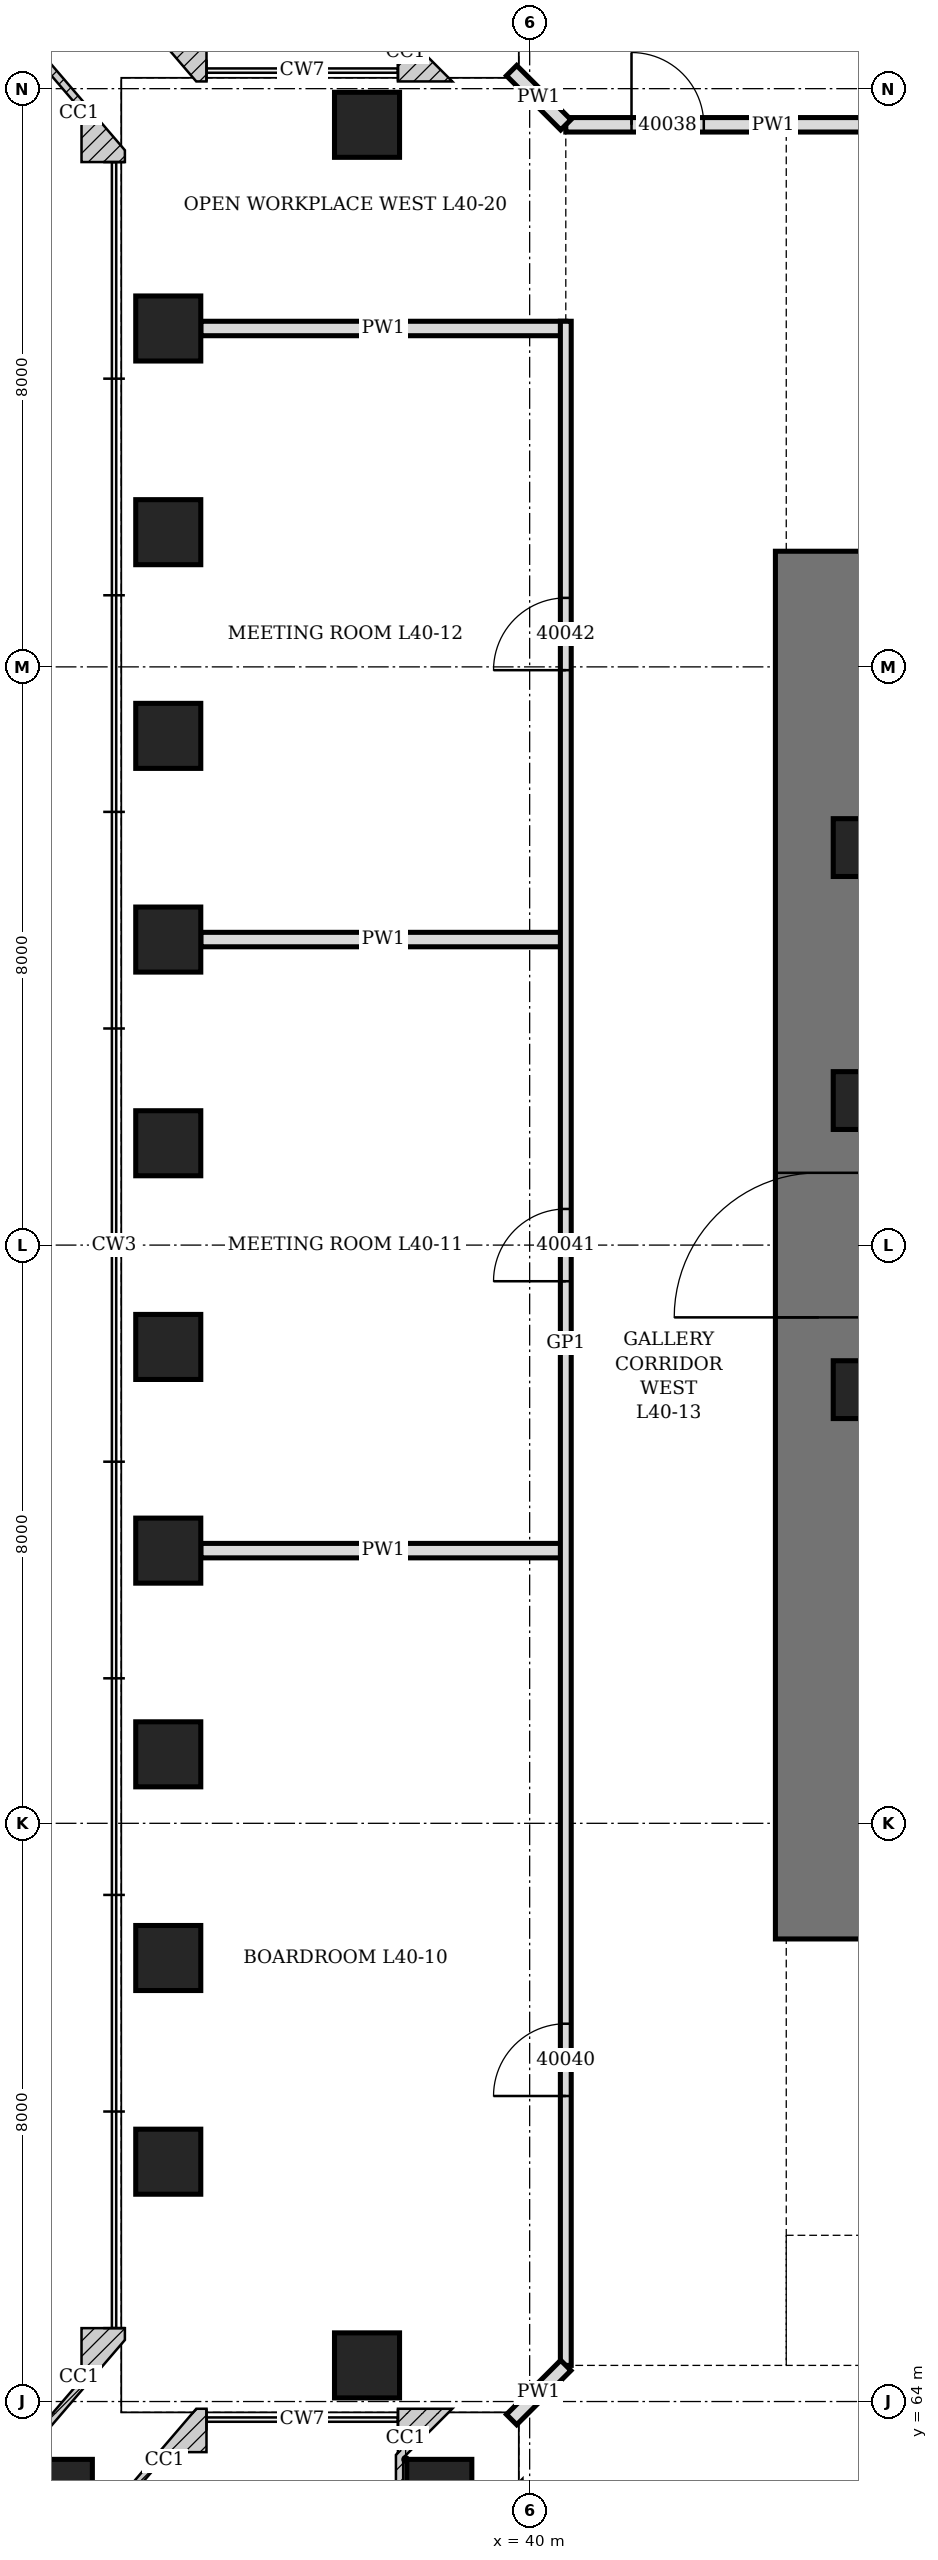
"""IFC4 building model, lengths in metres.
Left out: names, types, materials, properties, quantities, classifications, styles, units other than length and angle.
Written with IfcOpenShell. Run it as: python <this file> out.ifc"""

import sys

from ifc_helpers import new_model, si_unit, direction, frame, frame_2d, origin, origin_2d, place, context, subcontext, project, spatial, rectangle, hollow_rectangle, extrude, clip, halfspace, element, fill, save


model = new_model("IFC4")
c1 = context("Model", 3, precision=1e-05, world=origin(), true_north=direction((0.0, 1.0)))
c2 = subcontext(c1, "Body", "Model", "MODEL_VIEW")
j1 = project(units=[si_unit("LENGTHUNIT", "METRE"), si_unit("PLANEANGLEUNIT", "RADIAN")], contexts=[c1])
p1 = place(None, origin())
s1 = spatial("IfcSite", under=j1, at=p1, CompositionType="ELEMENT")
p2 = place(p1, origin())
s2 = spatial("IfcBuilding", under=s1, at=p2, CompositionType="ELEMENT")
p3 = place(p2, frame((0.0, 0.0, 181.3)))
s3 = spatial("IfcBuildingStorey", under=s2, at=p3, CompositionType="ELEMENT", Elevation=181.3)
p4 = place(p3, frame((38.75, 97.25, -0.25), z_axis=(0.343685624304, -0.343685624304, 0.873933855216), x_axis=(0.707106781187, 0.707106781187, 0.0)))
e1 = element("IfcColumn", 1, at=p4, inside=s3, PredefinedType="COLUMN", context=c2, shape_type="Clipping", body=[
    clip(clip(extrude(hollow_rectangle(XDim=0.9, YDim=0.9, WallThickness=0.15, at=origin_2d()), origin(), (0.0, 0.0, 1.0), 5.092), halfspace(frame((0.0, 0.0, 0.253), z_axis=(0.0, 0.0, 1.0), x_axis=(1.0, 0.0, 0.0)), True)), halfspace(frame((0.0, 0.0, 4.839), z_axis=(0.0, 0.0, -1.0), x_axis=(1.0, 0.0, 0.0)), True)),
])
p5 = place(p3, frame((37.75, 95.5, -0.25), z_axis=(0.0, 0.0, 1.0), x_axis=(1.0, 0.0, 0.0)))
e2 = element("IfcColumn", 2, at=p5, inside=s3, PredefinedType="COLUMN", context=c2, shape_type="SweptSolid", body=[
    extrude(hollow_rectangle(XDim=0.9, YDim=0.9, WallThickness=0.15, at=origin_2d()), origin(), (0.0, 0.0, 1.0), 4.45),
])
p6 = place(p3, frame((33.5, 97.25, -0.25), z_axis=(0.299314960964, -0.349200787792, 0.887957974202), x_axis=(0.759256602365, 0.650791373456, 0.0)))
e3 = element("IfcColumn", 3, at=p6, inside=s3, PredefinedType="COLUMN", context=c2, shape_type="Clipping", body=[
    clip(clip(extrude(hollow_rectangle(XDim=0.9, YDim=0.9, WallThickness=0.15, at=origin_2d()), origin(), (0.0, 0.0, 1.0), 5.011), halfspace(frame((0.0, 0.0, 0.235), z_axis=(0.0, 0.0, 1.0), x_axis=(1.0, 0.0, 0.0)), True)), halfspace(frame((0.0, 0.0, 4.776), z_axis=(0.0, 0.0, -1.0), x_axis=(1.0, 0.0, 0.0)), True)),
])
for number, where, z_axis, x_axis in (
    (4, (35.0, 92.682, -0.25), (0.0, 0.0, 1.0), (0.0, 1.0, 0.0)),
    (5, (35.0, 89.864, -0.25), (0.0, 0.0, 1.0), (0.0, 1.0, 0.0)),
    (6, (35.0, 87.045, -0.25), (0.0, 0.0, 1.0), (0.0, 1.0, 0.0)),
    (7, (35.0, 84.227, -0.25), (0.0, 0.0, 1.0), (0.0, 1.0, 0.0)),
    (8, (35.0, 81.409, -0.25), (0.0, 0.0, 1.0), (0.0, 1.0, 0.0)),
    (9, (35.0, 78.591, -0.25), (0.0, 0.0, 1.0), (0.0, 1.0, 0.0)),
    (10, (35.0, 75.773, -0.25), (0.0, 0.0, 1.0), (0.0, 1.0, 0.0)),
    (11, (35.0, 72.955, -0.25), (0.0, 0.0, 1.0), (0.0, 1.0, 0.0)),
    (12, (35.0, 70.136, -0.25), (0.0, 0.0, 1.0), (0.0, 1.0, 0.0)),
    (13, (35.0, 67.318, -0.25), (0.0, 0.0, 1.0), (0.0, 1.0, 0.0)),
):
    element("IfcColumn", number, at=place(p3, frame(where, z_axis=z_axis, x_axis=x_axis)), inside=s3, PredefinedType="COLUMN", context=c2, shape_type="SweptSolid", body=[
        extrude(hollow_rectangle(XDim=0.9, YDim=0.9, WallThickness=0.15, at=origin_2d()), origin(), (0.0, 0.0, 1.0), 4.45),
    ])
p7 = place(p3, frame((33.5, 62.75, -0.25), z_axis=(0.299314960964, 0.349200787792, 0.887957974202), x_axis=(-0.759256602365, 0.650791373456, 0.0)))
e14 = element("IfcColumn", 14, at=p7, inside=s3, PredefinedType="COLUMN", context=c2, shape_type="Clipping", body=[
    clip(clip(extrude(hollow_rectangle(XDim=0.9, YDim=0.9, WallThickness=0.15, at=origin_2d()), origin(), (0.0, 0.0, 1.0), 5.011), halfspace(frame((0.0, 0.0, 0.235), z_axis=(0.0, 0.0, 1.0), x_axis=(1.0, 0.0, 0.0)), True)), halfspace(frame((0.0, 0.0, 4.776), z_axis=(0.0, 0.0, -1.0), x_axis=(1.0, 0.0, 0.0)), True)),
])
p8 = place(p3, frame((37.75, 64.5, -0.25), z_axis=(0.0, 0.0, 1.0), x_axis=(1.0, 0.0, 0.0)))
e15 = element("IfcColumn", 15, at=p8, inside=s3, PredefinedType="COLUMN", context=c2, shape_type="SweptSolid", body=[
    extrude(hollow_rectangle(XDim=0.9, YDim=0.9, WallThickness=0.15, at=origin_2d()), origin(), (0.0, 0.0, 1.0), 4.45),
])
p9 = place(p3, frame((38.75, 62.75, -0.25), z_axis=(0.343685624304, 0.343685624304, 0.873933855216), x_axis=(-0.707106781187, 0.707106781187, 0.0)))
e16 = element("IfcColumn", 16, at=p9, inside=s3, PredefinedType="COLUMN", context=c2, shape_type="Clipping", body=[
    clip(clip(extrude(hollow_rectangle(XDim=0.9, YDim=0.9, WallThickness=0.15, at=origin_2d()), origin(), (0.0, 0.0, 1.0), 5.092), halfspace(frame((0.0, 0.0, 0.253), z_axis=(0.0, 0.0, 1.0), x_axis=(1.0, 0.0, 0.0)), True)), halfspace(frame((0.0, 0.0, 4.839), z_axis=(0.0, 0.0, -1.0), x_axis=(1.0, 0.0, 0.0)), True)),
])
p10 = place(p3, frame((44.0, 70.4, 0.0), z_axis=(0.0, 0.0, 1.0), x_axis=(0.0, 1.0, 0.0)))
e17 = element("IfcWall", 17, at=p10, inside=s3, PredefinedType="SHEAR", context=c2, shape_type="SweptSolid", body=[
    extrude(rectangle(XDim=19.2, YDim=1.2, at=frame_2d((9.6, 0.0))), origin(), (0.0, 0.0, 1.0), 4.2),
])
p11 = place(p10, frame((8.6, 0.0, 0.0)))
e18 = element("IfcOpeningElement", 18, at=p11, cuts=e17, PredefinedType="OPENING", context=c2, shape_type="SweptSolid", body=[
    extrude(rectangle(XDim=2.0, YDim=2.4, at=frame_2d((1.0, 1.2))), frame((0.0, 0.61, 0.0), z_axis=(0.0, -1.0, 0.0), x_axis=(1.0, 0.0, 0.0)), (0.0, 0.0, 1.0), 1.22),
])
for number, where, z_axis, x_axis in (
    (19, (44.6, 78.0, 0.0), (0.0, 0.0, 1.0), (1.0, 0.0, 0.0)),
    (20, (44.6, 82.0, 0.0), (0.0, 0.0, 1.0), (1.0, 0.0, 0.0)),
    (21, (44.6, 85.5, 0.0), (0.0, 0.0, 1.0), (1.0, 0.0, 0.0)),
):
    element("IfcColumn", number, at=place(p3, frame(where, z_axis=z_axis, x_axis=x_axis)), inside=s3, PredefinedType="COLUMN", context=c2, shape_type="SweptSolid", body=[
        extrude(hollow_rectangle(XDim=0.8, YDim=0.8, WallThickness=0.1, at=origin_2d()), origin(), (0.0, 0.0, 1.0), 4.2),
    ])
for number, where, z_axis, x_axis in (
    (22, (35.45, 75.773, 0.0), (0.0, 0.0, 1.0), (1.0, 0.0, 0.0)),
    (23, (35.45, 84.227, 0.0), (0.0, 0.0, 1.0), (1.0, 0.0, 0.0)),
    (24, (35.45, 92.682, 0.0), (0.0, 0.0, 1.0), (1.0, 0.0, 0.0)),
):
    element("IfcWall", number, at=place(p3, frame(where, z_axis=z_axis, x_axis=x_axis)), inside=s3, PredefinedType="PARTITIONING", context=c2, shape_type="SweptSolid", body=[
        extrude(rectangle(XDim=5.05, YDim=0.2, at=frame_2d((2.525, 0.0))), origin(), (0.0, 0.0, 1.0), 3.428),
    ])
p12 = place(p3, frame((40.5, 95.5, 0.0), z_axis=(0.0, 0.0, 1.0), x_axis=(1.0, 0.0, 0.0)))
e25 = element("IfcWall", 25, at=p12, inside=s3, PredefinedType="PARTITIONING", context=c2, shape_type="SweptSolid", body=[
    extrude(rectangle(XDim=5.736, YDim=0.2, at=frame_2d((2.868, 0.0))), origin(), (0.0, 0.0, 1.0), 4.04),
])
p13 = place(p12, frame((0.909, 0.0, 0.0)))
e26 = element("IfcOpeningElement", 26, at=p13, cuts=e25, PredefinedType="OPENING", context=c2, shape_type="SweptSolid", body=[
    extrude(rectangle(XDim=1.0, YDim=2.1, at=frame_2d((0.5, 1.05))), frame((0.0, 0.11, 0.0), z_axis=(0.0, -1.0, 0.0), x_axis=(1.0, 0.0, 0.0)), (0.0, 0.0, 1.0), 0.22),
])
p14 = place(p3, frame((40.5, 64.5, 0.0), z_axis=(0.0, 0.0, 1.0), x_axis=(0.0, 1.0, 0.0)))
e27 = element("IfcWall", 27, at=p14, inside=s3, PredefinedType="PARTITIONING", context=c2, shape_type="SweptSolid", body=[
    extrude(rectangle(XDim=28.282, YDim=0.15, at=frame_2d((14.141, 0.0))), origin(), (0.0, 0.0, 1.0), 4.04),
])
p15 = place(p14, frame((3.727, 0.0, 0.0)))
e28 = element("IfcOpeningElement", 28, at=p15, cuts=e27, PredefinedType="OPENING", context=c2, shape_type="SweptSolid", body=[
    extrude(rectangle(XDim=1.0, YDim=2.4, at=frame_2d((0.5, 1.2))), frame((0.0, 0.085, 0.0), z_axis=(0.0, -1.0, 0.0), x_axis=(1.0, 0.0, 0.0)), (0.0, 0.0, 1.0), 0.17),
])
p16 = place(p14, frame((15.0, 0.0, 0.0)))
e29 = element("IfcOpeningElement", 29, at=p16, cuts=e27, PredefinedType="OPENING", context=c2, shape_type="SweptSolid", body=[
    extrude(rectangle(XDim=1.0, YDim=2.4, at=frame_2d((0.5, 1.2))), frame((0.0, 0.085, 0.0), z_axis=(0.0, -1.0, 0.0), x_axis=(1.0, 0.0, 0.0)), (0.0, 0.0, 1.0), 0.17),
])
p17 = place(p14, frame((23.455, 0.0, 0.0)))
e30 = element("IfcOpeningElement", 30, at=p17, cuts=e27, PredefinedType="OPENING", context=c2, shape_type="SweptSolid", body=[
    extrude(rectangle(XDim=1.0, YDim=2.4, at=frame_2d((0.5, 1.2))), frame((0.0, 0.085, 0.0), z_axis=(0.0, -1.0, 0.0), x_axis=(1.0, 0.0, 0.0)), (0.0, 0.0, 1.0), 0.17),
])
for number, where, z_axis, x_axis in (
    (31, (40.5, 95.5, 0.0), (0.0, 0.0, 1.0), (-0.707, 0.707, 0.0)),
    (32, (40.5, 64.5, 0.0), (0.0, 0.0, 1.0), (-0.707, -0.707, 0.0)),
):
    element("IfcWall", number, at=place(p3, frame(where, z_axis=z_axis, x_axis=x_axis)), inside=s3, PredefinedType="PARTITIONING", context=c2, shape_type="SweptSolid", body=[
        extrude(rectangle(XDim=1.061, YDim=0.2, at=frame_2d((0.53, 0.0))), origin(), (0.0, 0.0, 1.0), 4.04),
    ])
p18 = place(p11, origin())
e33 = element("IfcDoor", 33, at=p18, inside=s3, OperationType="DOUBLE_DOOR_SINGLE_SWING", PredefinedType="DOOR", context=c2, shape_type="SweptSolid", body=[
    extrude(rectangle(XDim=2.0, YDim=2.4, at=frame_2d((1.0, 1.2))), frame((0.0, 0.35, 0.0), z_axis=(0.0, -1.0, 0.0), x_axis=(1.0, 0.0, 0.0)), (0.0, 0.0, 1.0), 0.7),
])
fill(e18, e33)
p19 = place(p13, origin())
e34 = element("IfcDoor", 34, at=p19, inside=s3, OperationType="SINGLE_SWING_LEFT", PredefinedType="DOOR", context=c2, shape_type="SweptSolid", body=[
    extrude(rectangle(XDim=1.0, YDim=2.1, at=frame_2d((0.5, 1.05))), frame((0.0, 0.1, 0.0), z_axis=(0.0, -1.0, 0.0), x_axis=(1.0, 0.0, 0.0)), (0.0, 0.0, 1.0), 0.199),
])
fill(e26, e34)
p20 = place(p15, origin())
e35 = element("IfcDoor", 35, at=p20, inside=s3, OperationType="SINGLE_SWING_RIGHT", PredefinedType="DOOR", context=c2, shape_type="SweptSolid", body=[
    extrude(rectangle(XDim=1.0, YDim=2.4, at=frame_2d((0.5, 1.2))), frame((0.0, 0.075, 0.0), z_axis=(0.0, -1.0, 0.0), x_axis=(1.0, 0.0, 0.0)), (0.0, 0.0, 1.0), 0.149),
])
fill(e28, e35)
p21 = place(p16, origin())
e36 = element("IfcDoor", 36, at=p21, inside=s3, OperationType="SINGLE_SWING_RIGHT", PredefinedType="DOOR", context=c2, shape_type="SweptSolid", body=[
    extrude(rectangle(XDim=1.0, YDim=2.4, at=frame_2d((0.5, 1.2))), frame((0.0, 0.075, 0.0), z_axis=(0.0, -1.0, 0.0), x_axis=(1.0, 0.0, 0.0)), (0.0, 0.0, 1.0), 0.149),
])
fill(e29, e36)
p22 = place(p17, origin())
e37 = element("IfcDoor", 37, at=p22, inside=s3, OperationType="SINGLE_SWING_RIGHT", PredefinedType="DOOR", context=c2, shape_type="SweptSolid", body=[
    extrude(rectangle(XDim=1.0, YDim=2.4, at=frame_2d((0.5, 1.2))), frame((0.0, 0.075, 0.0), z_axis=(0.0, -1.0, 0.0), x_axis=(1.0, 0.0, 0.0)), (0.0, 0.0, 1.0), 0.149),
])
fill(e30, e37)
save(model, sys.argv[1])
